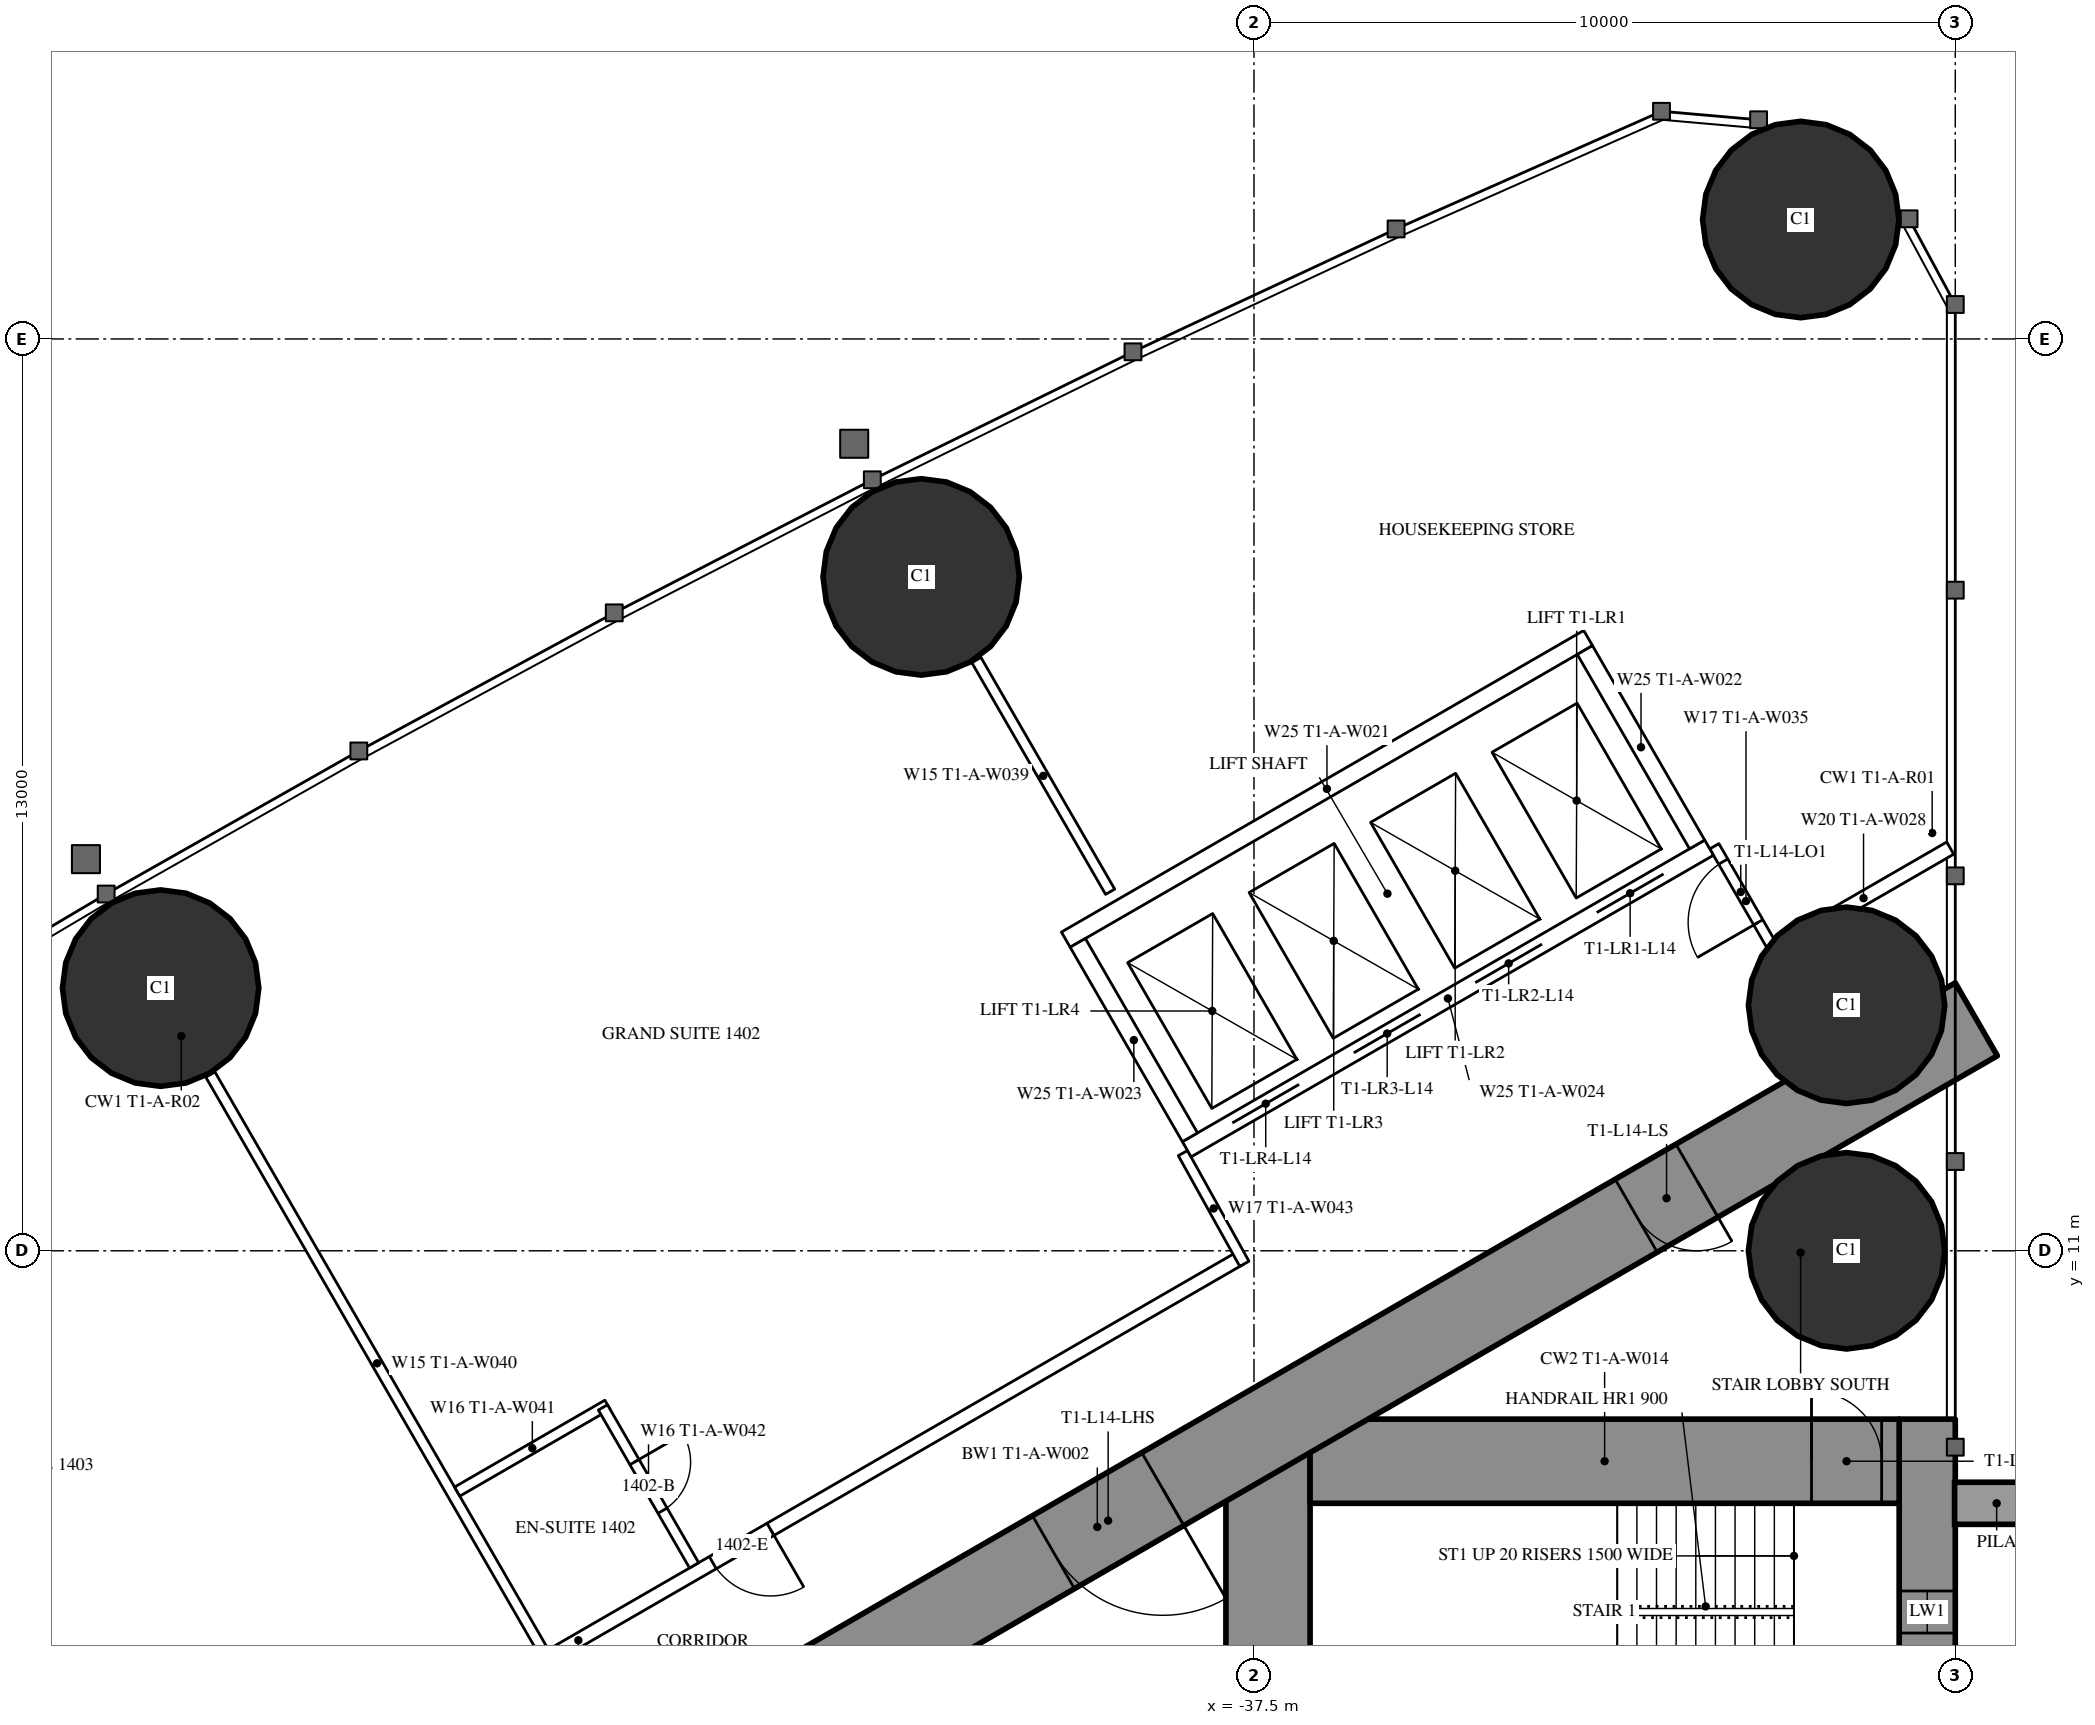
"""IFC4 building model, lengths in metres.
Left out: names, types, materials, properties, quantities, classifications, styles, units other than length and angle.
Written with IfcOpenShell. Run it as: python <this file> out.ifc"""

import sys

from ifc_helpers import new_model, si_unit, direction, frame, frame_2d, origin, origin_2d, place, context, subcontext, project, spatial, rectangle, hollow_circle, extrude, element, fill, save


model = new_model("IFC4")
c1 = context("Model", 3, precision=1e-05, world=origin(), true_north=direction((0.0, 1.0)))
c2 = subcontext(c1, "Body", "Model", "MODEL_VIEW")
j1 = project(units=[si_unit("LENGTHUNIT", "METRE"), si_unit("PLANEANGLEUNIT", "RADIAN")], contexts=[c1])
p1 = place(None, origin())
s1 = spatial("IfcSite", under=j1, at=p1, CompositionType="ELEMENT")
p2 = place(p1, origin())
s2 = spatial("IfcBuilding", under=s1, at=p2, CompositionType="ELEMENT")
p3 = place(p2, frame((0.0, 0.0, 56.5)))
s3 = spatial("IfcBuildingStorey", under=s2, at=p3, CompositionType="ELEMENT", Elevation=56.5)
for number, where, z_axis, x_axis in (
    (1, (-29.703, 25.703, 0.0), (0.0, 0.0, 1.0), (1.0, 0.0, 0.0)),
    (2, (-29.05, 11.0, 0.0), (0.0, 0.0, 1.0), (1.0, 0.0, 0.0)),
    (3, (-29.05, 14.5, 0.0), (0.0, 0.0, 1.0), (1.0, 0.0, 0.0)),
    (4, (-42.245, 20.607, 0.0), (0.0, 0.0, 1.0), (1.0, 0.0, 0.0)),
    (5, (-53.09, 14.745, 0.0), (0.0, 0.0, 1.0), (1.0, 0.0, 0.0)),
):
    element("IfcColumn", number, at=place(p3, frame(where, z_axis=z_axis, x_axis=x_axis)), inside=s3, PredefinedType="COLUMN", context=c2, shape_type="SweptSolid", body=[
        extrude(hollow_circle(Radius=1.4, WallThickness=0.12, at=origin_2d()), origin(), (0.0, 0.0, 1.0), 3.5),
    ])
p4 = place(p3, frame((-27.9, 8.6, 0.0), z_axis=(0.0, 0.0, 1.0), x_axis=(0.0, -1.0, 0.0)))
e6 = element("IfcWall", 6, at=p4, inside=s3, PredefinedType="SHEAR", context=c2, shape_type="SweptSolid", body=[
    extrude(rectangle(XDim=17.2, YDim=0.8, at=frame_2d((8.6, 0.0))), origin(), (0.0, 0.0, 1.0), 3.5),
])
p5 = place(p4, frame((2.45, 0.0, 0.6)))
e7 = element("IfcOpeningElement", 7, at=p5, cuts=e6, PredefinedType="OPENING", context=c2, shape_type="SweptSolid", body=[
    extrude(rectangle(XDim=0.6, YDim=2.1, at=frame_2d((0.3, 1.05))), frame((0.0, 0.41, 0.0), z_axis=(0.0, -1.0, 0.0), x_axis=(1.0, 0.0, 0.0)), (0.0, 0.0, 1.0), 0.82),
])
p6 = place(p4, frame((14.15, 0.0, 0.6)))
e8 = element("IfcOpeningElement", 8, at=p6, cuts=e6, PredefinedType="OPENING", context=c2, shape_type="SweptSolid", body=[
    extrude(rectangle(XDim=0.6, YDim=2.1, at=frame_2d((0.3, 1.05))), frame((0.0, 0.41, 0.0), z_axis=(0.0, -1.0, 0.0), x_axis=(1.0, 0.0, 0.0)), (0.0, 0.0, 1.0), 0.82),
])
p7 = place(p3, frame((-37.3, 8.6, 0.0), z_axis=(0.0, 0.0, 1.0), x_axis=(0.0, -1.0, 0.0)))
e9 = element("IfcWall", 9, at=p7, inside=s3, PredefinedType="SHEAR", context=c2, shape_type="SweptSolid", body=[
    extrude(rectangle(XDim=17.2, YDim=1.2, at=frame_2d((8.6, 0.0))), origin(), (0.0, 0.0, 1.0), 3.5),
])
p8 = place(p7, frame((7.7, 0.0, 0.0)))
e10 = element("IfcOpeningElement", 10, at=p8, cuts=e9, PredefinedType="OPENING", context=c2, shape_type="SweptSolid", body=[
    extrude(rectangle(XDim=1.8, YDim=2.2, at=frame_2d((0.9, 1.1))), frame((0.0, 0.61, 0.0), z_axis=(0.0, -1.0, 0.0), x_axis=(1.0, 0.0, 0.0)), (0.0, 0.0, 1.0), 1.22),
])
p9 = place(p3, frame((-28.3, 8.0, 0.0), z_axis=(0.0, 0.0, 1.0), x_axis=(-1.0, 0.0, 0.0)))
e11 = element("IfcWall", 11, at=p9, inside=s3, PredefinedType="SHEAR", context=c2, shape_type="SweptSolid", body=[
    extrude(rectangle(XDim=8.4, YDim=1.2, at=frame_2d((4.2, 0.0))), origin(), (0.0, 0.0, 1.0), 3.5),
])
p10 = place(p9, frame((0.25, 0.0, 0.0)))
e12 = element("IfcOpeningElement", 12, at=p10, cuts=e11, PredefinedType="OPENING", context=c2, shape_type="SweptSolid", body=[
    extrude(rectangle(XDim=1.0, YDim=2.2, at=frame_2d((0.5, 1.1))), frame((0.0, 0.61, 0.0), z_axis=(0.0, -1.0, 0.0), x_axis=(1.0, 0.0, 0.0)), (0.0, 0.0, 1.0), 1.22),
])
p11 = place(p3, frame((-27.2, 14.3, 0.0), z_axis=(0.0, 0.0, 1.0), x_axis=(-0.866026593062, -0.499997940104, 0.0)))
e13 = element("IfcWall", 13, at=p11, inside=s3, PredefinedType="SHEAR", context=c2, shape_type="SweptSolid", body=[
    extrude(rectangle(XDim=28.946, YDim=1.2, at=frame_2d((14.473, 0.0))), origin(), (0.0, 0.0, 1.0), 3.5),
])
p12 = place(p11, frame((4.6, 0.0, 0.0)))
e14 = element("IfcOpeningElement", 14, at=p12, cuts=e13, PredefinedType="OPENING", context=c2, shape_type="SweptSolid", body=[
    extrude(rectangle(XDim=1.0, YDim=2.2, at=frame_2d((0.5, 1.1))), frame((0.0, 0.61, 0.0), z_axis=(0.0, -1.0, 0.0), x_axis=(1.0, 0.0, 0.0)), (0.0, 0.0, 1.0), 1.22),
])
p13 = place(p11, frame((13.395, 0.0, 0.0)))
e15 = element("IfcOpeningElement", 15, at=p13, cuts=e13, PredefinedType="OPENING", context=c2, shape_type="SweptSolid", body=[
    extrude(rectangle(XDim=1.8, YDim=2.2, at=frame_2d((0.9, 1.1))), frame((0.0, 0.61, 0.0), z_axis=(0.0, -1.0, 0.0), x_axis=(1.0, 0.0, 0.0)), (0.0, 0.0, 1.0), 1.22),
])
p14 = place(p3, frame((-47.627, 5.278, 0.0), z_axis=(0.0, 0.0, 1.0), x_axis=(-0.500009844318, 0.86601972009, 0.0)))
e16 = element("IfcWall", 16, at=p14, inside=s3, PredefinedType="PARTITIONING", context=c2, shape_type="SweptSolid", body=[
    extrude(rectangle(XDim=9.51, YDim=0.15, at=frame_2d((4.755, 0.0))), origin(), (0.0, 0.0, 1.0), 2.25),
])
p15 = place(p3, frame((-39.551, 16.119, 0.0), z_axis=(0.0, 0.0, 1.0), x_axis=(-0.500014214979, 0.866017196607, 0.0)))
e17 = element("IfcWall", 17, at=p15, inside=s3, PredefinedType="PARTITIONING", context=c2, shape_type="SweptSolid", body=[
    extrude(rectangle(XDim=3.815, YDim=0.15, at=frame_2d((1.907, 0.0))), origin(), (0.0, 0.0, 1.0), 3.25),
])
p16 = place(p3, frame((-27.572, 16.741, 0.0), z_axis=(0.0, 0.0, 1.0), x_axis=(-0.866034618596, -0.499984039138, 0.0)))
e18 = element("IfcWall", 18, at=p16, inside=s3, PredefinedType="PARTITIONING", context=c2, shape_type="SweptSolid", body=[
    extrude(rectangle(XDim=2.854, YDim=0.2, at=frame_2d((1.427, 0.0))), origin(), (0.0, 0.0, 1.0), 3.25),
])
p17 = place(p3, frame((-37.7, 10.894, 0.0), z_axis=(0.0, 0.0, 1.0), x_axis=(-0.866027905338, -0.499995667157, 0.0)))
e19 = element("IfcWall", 19, at=p17, inside=s3, PredefinedType="PARTITIONING", context=c2, shape_type="SweptSolid", body=[
    extrude(rectangle(XDim=21.787, YDim=0.2, at=frame_2d((10.894, 0.0))), origin(), (0.0, 0.0, 1.0), 3.25),
])
p18 = place(p17, frame((20.237, 0.0, 0.0)))
e20 = element("IfcOpeningElement", 20, at=p18, cuts=e19, PredefinedType="OPENING", context=c2, shape_type="SweptSolid", body=[
    extrude(rectangle(XDim=0.95, YDim=2.2, at=frame_2d((0.475, 1.1))), frame((0.0, 0.11, 0.0), z_axis=(0.0, -1.0, 0.0), x_axis=(1.0, 0.0, 0.0)), (0.0, 0.0, 1.0), 0.22),
])
p19 = place(p17, frame((7.73, 0.0, 0.0)))
e21 = element("IfcOpeningElement", 21, at=p19, cuts=e19, PredefinedType="OPENING", context=c2, shape_type="SweptSolid", body=[
    extrude(rectangle(XDim=0.95, YDim=2.2, at=frame_2d((0.475, 1.1))), frame((0.0, 0.11, 0.0), z_axis=(0.0, -1.0, 0.0), x_axis=(1.0, 0.0, 0.0)), (0.0, 0.0, 1.0), 0.22),
])
p20 = place(p3, frame((-38.513, 12.392, 0.0), z_axis=(0.0, 0.0, 1.0), x_axis=(0.485585508183, -0.874189175317, 0.0)))
e22 = element("IfcWall", 22, at=p20, inside=s3, PredefinedType="PARTITIONING", context=c2, shape_type="SweptSolid", body=[
    extrude(rectangle(XDim=1.805, YDim=0.15, at=frame_2d((0.902, 0.0))), origin(), (0.0, 0.0, 1.0), 3.25),
])
p21 = place(p3, frame((-30.033, 15.205, 0.0), z_axis=(0.0, 0.0, 1.0), x_axis=(-0.499980071345, 0.866036909293, 0.0)))
e23 = element("IfcWall", 23, at=p21, inside=s3, PredefinedType="PARTITIONING", context=c2, shape_type="SweptSolid", body=[
    extrude(rectangle(XDim=1.805, YDim=0.15, at=frame_2d((0.902, 0.0))), origin(), (0.0, 0.0, 1.0), 3.25),
])
p22 = place(p21, frame((0.552, 0.0, 0.0)))
e24 = element("IfcOpeningElement", 24, at=p22, cuts=e23, PredefinedType="OPENING", context=c2, shape_type="SweptSolid", body=[
    extrude(rectangle(XDim=1.0, YDim=2.2, at=frame_2d((0.5, 1.1))), frame((0.0, 0.085, 0.0), z_axis=(0.0, -1.0, 0.0), x_axis=(1.0, 0.0, 0.0)), (0.0, 0.0, 1.0), 0.17),
])
p23 = place(p3, frame((-46.719, 8.804, 0.0), z_axis=(0.0, 0.0, 1.0), x_axis=(-0.866006523861, -0.500032699561, 0.0)))
e25 = element("IfcWall", 25, at=p23, inside=s3, PredefinedType="PARTITIONING", context=c2, shape_type="SweptSolid", body=[
    extrude(rectangle(XDim=2.475, YDim=0.15, at=frame_2d((1.237, 0.0))), origin(), (0.0, 0.0, 1.0), 3.25),
])
p24 = place(p3, frame((-45.483, 6.515, 0.0), z_axis=(0.0, 0.0, 1.0), x_axis=(-0.500006934395, 0.866021400173, 0.0)))
e26 = element("IfcWall", 26, at=p24, inside=s3, PredefinedType="PARTITIONING", context=c2, shape_type="SweptSolid", body=[
    extrude(rectangle(XDim=2.6, YDim=0.15, at=frame_2d((1.3, 0.0))), origin(), (0.0, 0.0, 1.0), 3.25),
])
p25 = place(p24, frame((0.9, 0.0, 0.0)))
e27 = element("IfcOpeningElement", 27, at=p25, cuts=e26, PredefinedType="OPENING", context=c2, shape_type="SweptSolid", body=[
    extrude(rectangle(XDim=0.8, YDim=2.2, at=frame_2d((0.4, 1.1))), frame((0.0, 0.085, 0.0), z_axis=(0.0, -1.0, 0.0), x_axis=(1.0, 0.0, 0.0)), (0.0, 0.0, 1.0), 0.17),
])
p26 = place(p3, frame((-31.01, 16.747, 0.0), z_axis=(0.0, 0.0, 1.0), x_axis=(-0.866028165386, -0.499995216735, 0.0)))
e28 = element("IfcWall", 28, at=p26, inside=s3, PredefinedType="PARTITIONING", context=c2, shape_type="SweptSolid", body=[
    extrude(rectangle(XDim=8.6, YDim=0.25, at=frame_2d((4.3, 0.0))), origin(), (0.0, 0.0, 1.0), 3.25),
])
p27 = place(p26, frame((0.75, 0.0, 0.0)))
e29 = element("IfcOpeningElement", 29, at=p27, cuts=e28, PredefinedType="OPENING", context=c2, shape_type="SweptSolid", body=[
    extrude(rectangle(XDim=1.1, YDim=2.2, at=frame_2d((0.55, 1.1))), frame((0.0, 0.135, 0.0), z_axis=(0.0, -1.0, 0.0), x_axis=(1.0, 0.0, 0.0)), (0.0, 0.0, 1.0), 0.27),
])
p28 = place(p26, frame((2.75, 0.0, 0.0)))
e30 = element("IfcOpeningElement", 30, at=p28, cuts=e28, PredefinedType="OPENING", context=c2, shape_type="SweptSolid", body=[
    extrude(rectangle(XDim=1.1, YDim=2.2, at=frame_2d((0.55, 1.1))), frame((0.0, 0.135, 0.0), z_axis=(0.0, -1.0, 0.0), x_axis=(1.0, 0.0, 0.0)), (0.0, 0.0, 1.0), 0.27),
])
p29 = place(p26, frame((4.75, 0.0, 0.0)))
e31 = element("IfcOpeningElement", 31, at=p29, cuts=e28, PredefinedType="OPENING", context=c2, shape_type="SweptSolid", body=[
    extrude(rectangle(XDim=1.1, YDim=2.2, at=frame_2d((0.55, 1.1))), frame((0.0, 0.135, 0.0), z_axis=(0.0, -1.0, 0.0), x_axis=(1.0, 0.0, 0.0)), (0.0, 0.0, 1.0), 0.27),
])
p30 = place(p26, frame((6.75, 0.0, 0.0)))
e32 = element("IfcOpeningElement", 32, at=p30, cuts=e28, PredefinedType="OPENING", context=c2, shape_type="SweptSolid", body=[
    extrude(rectangle(XDim=1.1, YDim=2.2, at=frame_2d((0.55, 1.1))), frame((0.0, 0.135, 0.0), z_axis=(0.0, -1.0, 0.0), x_axis=(1.0, 0.0, 0.0)), (0.0, 0.0, 1.0), 0.27),
])
p31 = place(p3, frame((-32.736, 19.736, 0.0), z_axis=(0.0, 0.0, 1.0), x_axis=(-0.866028165386, -0.499995216735, 0.0)))
e33 = element("IfcWall", 33, at=p31, inside=s3, PredefinedType="PARTITIONING", context=c2, shape_type="SweptSolid", body=[
    extrude(rectangle(XDim=8.6, YDim=0.25, at=frame_2d((4.3, 0.0))), origin(), (0.0, 0.0, 1.0), 3.25),
])
p32 = place(p3, frame((-31.181, 16.793, 0.0), z_axis=(0.0, 0.0, 1.0), x_axis=(-0.499929347863, 0.866066190972, 0.0)))
e34 = element("IfcWall", 34, at=p32, inside=s3, PredefinedType="PARTITIONING", context=c2, shape_type="SweptSolid", body=[
    extrude(rectangle(XDim=3.201, YDim=0.25, at=frame_2d((1.6, 0.0))), origin(), (0.0, 0.0, 1.0), 3.25),
])
p33 = place(p3, frame((-38.413, 12.618, 0.0), z_axis=(0.0, 0.0, 1.0), x_axis=(-0.499872130319, 0.866099216793, 0.0)))
e35 = element("IfcWall", 35, at=p33, inside=s3, PredefinedType="PARTITIONING", context=c2, shape_type="SweptSolid", body=[
    extrude(rectangle(XDim=3.2, YDim=0.25, at=frame_2d((1.6, 0.0))), origin(), (0.0, 0.0, 1.0), 3.25),
])
p34 = place(p25, origin())
e36 = element("IfcDoor", 36, at=p34, inside=s3, OperationType="SINGLE_SWING_RIGHT", PredefinedType="DOOR", context=c2, shape_type="SweptSolid", body=[
    extrude(rectangle(XDim=0.8, YDim=2.2, at=frame_2d((0.4, 1.1))), frame((0.0, 0.025, 0.0), z_axis=(0.0, -1.0, 0.0), x_axis=(1.0, 0.0, 0.0)), (0.0, 0.0, 1.0), 0.05),
])
fill(e27, e36)
p35 = place(p19, origin())
e37 = element("IfcDoor", 37, at=p35, inside=s3, OperationType="SINGLE_SWING_LEFT", PredefinedType="DOOR", context=c2, shape_type="SweptSolid", body=[
    extrude(rectangle(XDim=0.95, YDim=2.2, at=frame_2d((0.475, 1.1))), frame((0.0, 0.025, 0.0), z_axis=(0.0, -1.0, 0.0), x_axis=(1.0, 0.0, 0.0)), (0.0, 0.0, 1.0), 0.05),
])
fill(e21, e37)
p36 = place(p22, origin())
e38 = element("IfcDoor", 38, at=p36, inside=s3, OperationType="SINGLE_SWING_LEFT", PredefinedType="DOOR", context=c2, shape_type="SweptSolid", body=[
    extrude(rectangle(XDim=1.0, YDim=2.2, at=frame_2d((0.5, 1.1))), frame((0.0, 0.025, 0.0), z_axis=(0.0, -1.0, 0.0), x_axis=(1.0, 0.0, 0.0)), (0.0, 0.0, 1.0), 0.05),
])
fill(e24, e38)
p37 = place(p12, origin())
e39 = element("IfcDoor", 39, at=p37, inside=s3, OperationType="SINGLE_SWING_LEFT", PredefinedType="DOOR", context=c2, shape_type="SweptSolid", body=[
    extrude(rectangle(XDim=1.0, YDim=2.2, at=frame_2d((0.5, 1.1))), frame((0.0, 0.025, 0.0), z_axis=(0.0, -1.0, 0.0), x_axis=(1.0, 0.0, 0.0)), (0.0, 0.0, 1.0), 0.05),
])
fill(e14, e39)
p38 = place(p13, origin())
e40 = element("IfcDoor", 40, at=p38, inside=s3, OperationType="DOUBLE_DOOR_SINGLE_SWING", PredefinedType="DOOR", context=c2, shape_type="SweptSolid", body=[
    extrude(rectangle(XDim=1.8, YDim=2.2, at=frame_2d((0.9, 1.1))), frame((0.0, 0.025, 0.0), z_axis=(0.0, -1.0, 0.0), x_axis=(1.0, 0.0, 0.0)), (0.0, 0.0, 1.0), 0.05),
])
fill(e15, e40)
p39 = place(p10, origin())
e41 = element("IfcDoor", 41, at=p39, inside=s3, OperationType="SINGLE_SWING_RIGHT", PredefinedType="DOOR", context=c2, shape_type="SweptSolid", body=[
    extrude(rectangle(XDim=1.0, YDim=2.2, at=frame_2d((0.5, 1.1))), frame((0.0, 0.025, 0.0), z_axis=(0.0, -1.0, 0.0), x_axis=(1.0, 0.0, 0.0)), (0.0, 0.0, 1.0), 0.05),
])
fill(e12, e41)
p40 = place(p27, origin())
e42 = element("IfcDoor", 42, at=p40, inside=s3, OperationType="DOUBLE_DOOR_SLIDING", PredefinedType="USERDEFINED", context=c2, shape_type="SweptSolid", body=[
    extrude(rectangle(XDim=1.1, YDim=2.2, at=frame_2d((0.55, 1.1))), frame((0.0, 0.025, 0.0), z_axis=(0.0, -1.0, 0.0), x_axis=(1.0, 0.0, 0.0)), (0.0, 0.0, 1.0), 0.05),
])
fill(e29, e42)
p41 = place(p28, origin())
e43 = element("IfcDoor", 43, at=p41, inside=s3, OperationType="DOUBLE_DOOR_SLIDING", PredefinedType="USERDEFINED", context=c2, shape_type="SweptSolid", body=[
    extrude(rectangle(XDim=1.1, YDim=2.2, at=frame_2d((0.55, 1.1))), frame((0.0, 0.025, 0.0), z_axis=(0.0, -1.0, 0.0), x_axis=(1.0, 0.0, 0.0)), (0.0, 0.0, 1.0), 0.05),
])
fill(e30, e43)
p42 = place(p29, origin())
e44 = element("IfcDoor", 44, at=p42, inside=s3, OperationType="DOUBLE_DOOR_SLIDING", PredefinedType="USERDEFINED", context=c2, shape_type="SweptSolid", body=[
    extrude(rectangle(XDim=1.1, YDim=2.2, at=frame_2d((0.55, 1.1))), frame((0.0, 0.025, 0.0), z_axis=(0.0, -1.0, 0.0), x_axis=(1.0, 0.0, 0.0)), (0.0, 0.0, 1.0), 0.05),
])
fill(e31, e44)
p43 = place(p30, origin())
e45 = element("IfcDoor", 45, at=p43, inside=s3, OperationType="DOUBLE_DOOR_SLIDING", PredefinedType="USERDEFINED", context=c2, shape_type="SweptSolid", body=[
    extrude(rectangle(XDim=1.1, YDim=2.2, at=frame_2d((0.55, 1.1))), frame((0.0, 0.025, 0.0), z_axis=(0.0, -1.0, 0.0), x_axis=(1.0, 0.0, 0.0)), (0.0, 0.0, 1.0), 0.05),
])
fill(e32, e45)
p44 = place(p5, origin())
e46 = element("IfcWindow", 46, at=p44, inside=s3, PartitioningType="SINGLE_PANEL", PredefinedType="WINDOW", context=c2, shape_type="SweptSolid", body=[
    extrude(rectangle(XDim=0.6, YDim=2.1, at=frame_2d((0.3, 1.05))), frame((0.0, 0.03, 0.0), z_axis=(0.0, -1.0, 0.0), x_axis=(1.0, 0.0, 0.0)), (0.0, 0.0, 1.0), 0.06),
])
fill(e7, e46)
save(model, sys.argv[1])
